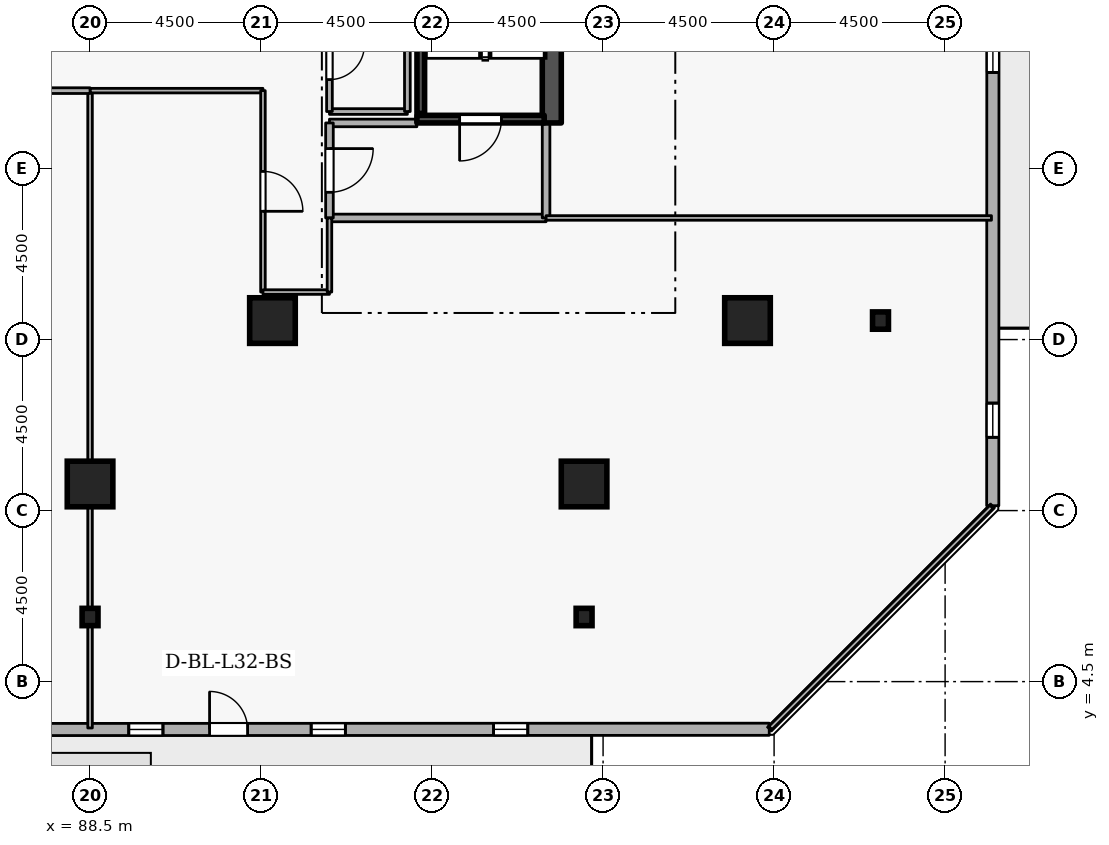
"""IFC4 building model, lengths in metres.
Left out: names, types, materials, properties, quantities, classifications, styles, units other than length and angle.
Written with IfcOpenShell. Run it as: python <this file> out.ifc"""

import sys

from ifc_helpers import new_model, si_unit, direction, frame, frame_2d, origin, origin_2d, place, context, subcontext, project, spatial, rectangle, i_section, extrude, element, fill, save


model = new_model("IFC4")
c1 = context("Model", 3, precision=1e-05, world=origin(), true_north=direction((0.0, 1.0)))
c2 = subcontext(c1, "Body", "Model", "MODEL_VIEW")
j1 = project(units=[si_unit("LENGTHUNIT", "METRE"), si_unit("PLANEANGLEUNIT", "RADIAN")], contexts=[c1])
p1 = place(None, origin())
s1 = spatial("IfcSite", under=j1, at=p1, CompositionType="ELEMENT")
p2 = place(p1, origin())
s2 = spatial("IfcBuilding", under=s1, at=p2, CompositionType="ELEMENT")
p3 = place(p2, frame((0.0, 0.0, 123.3)))
s3 = spatial("IfcBuildingStorey", under=s2, at=p3, CompositionType="ELEMENT", Elevation=123.3)
p4 = place(p3, frame((100.65, 19.2, 0.0), z_axis=(0.0, 0.0, 1.0), x_axis=(0.0, 1.0, 0.0)))
e1 = element("IfcWall", 1, at=p4, inside=s3, PredefinedType="SHEAR", context=c2, shape_type="SweptSolid", body=[
    extrude(rectangle(XDim=15.6, YDim=0.5, at=frame_2d((7.8, 0.0))), origin(), (0.0, 0.0, 1.0), 3.6),
])
for number, where, z_axis, x_axis in (
    (2, (105.8, 14.0, 0.0), (0.0, 0.0, 1.0), (1.0, 0.0, 0.0)),
    (3, (101.5, 9.7, 0.0), (0.0, 0.0, 1.0), (1.0, 0.0, 0.0)),
    (4, (88.5, 9.7, 0.0), (0.0, 0.0, 1.0), (1.0, 0.0, 0.0)),
    (5, (93.3, 14.0, 0.0), (0.0, 0.0, 1.0), (1.0, 0.0, 0.0)),
):
    element("IfcColumn", number, at=place(p3, frame(where, z_axis=z_axis, x_axis=x_axis)), inside=s3, PredefinedType="COLUMN", context=c2, shape_type="SweptSolid", body=[
        extrude(rectangle(XDim=1.2, YDim=1.2, at=origin_2d()), origin(), (0.0, 0.0, 1.0), 3.6),
    ])
for number, where, z_axis, x_axis in (
    (6, (109.3, 14.0, 0.0), (0.0, 0.0, 1.0), (1.0, 0.0, 0.0)),
    (7, (101.5, 6.2, 0.0), (0.0, 0.0, 1.0), (1.0, 0.0, 0.0)),
    (8, (88.5, 6.2, 0.0), (0.0, 0.0, 1.0), (1.0, 0.0, 0.0)),
):
    element("IfcColumn", number, at=place(p3, frame(where, z_axis=z_axis, x_axis=x_axis)), inside=s3, PredefinedType="COLUMN", context=c2, shape_type="SweptSolid", body=[
        extrude(i_section(OverallWidth=0.418, OverallDepth=0.456, WebThickness=0.042, FlangeThickness=0.067, FilletRadius=0.015, at=origin_2d()), origin(), (0.0, 0.0, 1.0), 3.6),
    ])
p5 = place(p3, frame((73.319, 3.235, 0.0), z_axis=(0.0, 0.0, 1.0), x_axis=(0.999999944762, 0.000332378036, 0.0)))
e9 = element("IfcWall", 9, at=p5, inside=s3, PredefinedType="STANDARD", context=c2, shape_type="SweptSolid", body=[
    extrude(rectangle(XDim=33.054, YDim=0.32, at=frame_2d((16.527, 0.0))), origin(), (0.0, 0.0, 1.0), 2.7),
])
p6 = place(p5, frame((18.327, 0.0, 0.0)))
e10 = element("IfcOpeningElement", 10, at=p6, cuts=e9, PredefinedType="OPENING", context=c2, shape_type="SweptSolid", body=[
    extrude(rectangle(XDim=1.0, YDim=2.08, at=frame_2d((0.5, 1.04))), frame((0.0, 0.17, 0.0), z_axis=(0.0, -1.0, 0.0), x_axis=(1.0, 0.0, 0.0)), (0.0, 0.0, 1.0), 0.34),
])
p7 = place(p5, frame((1.8, 0.0, 0.72)))
e11 = element("IfcOpeningElement", 11, at=p7, cuts=e9, PredefinedType="OPENING", context=c2, shape_type="SweptSolid", body=[
    extrude(rectangle(XDim=0.9, YDim=1.75, at=frame_2d((0.45, 0.875))), frame((0.0, 0.17, 0.0), z_axis=(0.0, -1.0, 0.0), x_axis=(1.0, 0.0, 0.0)), (0.0, 0.0, 1.0), 0.34),
])
p8 = place(p5, frame((6.6, 0.0, 0.72)))
e12 = element("IfcOpeningElement", 12, at=p8, cuts=e9, PredefinedType="OPENING", context=c2, shape_type="SweptSolid", body=[
    extrude(rectangle(XDim=0.9, YDim=1.75, at=frame_2d((0.45, 0.875))), frame((0.0, 0.17, 0.0), z_axis=(0.0, -1.0, 0.0), x_axis=(1.0, 0.0, 0.0)), (0.0, 0.0, 1.0), 0.34),
])
p9 = place(p5, frame((11.4, 0.0, 0.72)))
e13 = element("IfcOpeningElement", 13, at=p9, cuts=e9, PredefinedType="OPENING", context=c2, shape_type="SweptSolid", body=[
    extrude(rectangle(XDim=0.9, YDim=1.75, at=frame_2d((0.45, 0.875))), frame((0.0, 0.17, 0.0), z_axis=(0.0, -1.0, 0.0), x_axis=(1.0, 0.0, 0.0)), (0.0, 0.0, 1.0), 0.34),
])
p10 = place(p5, frame((16.2, 0.0, 0.72)))
e14 = element("IfcOpeningElement", 14, at=p10, cuts=e9, PredefinedType="OPENING", context=c2, shape_type="SweptSolid", body=[
    extrude(rectangle(XDim=0.9, YDim=1.75, at=frame_2d((0.45, 0.875))), frame((0.0, 0.17, 0.0), z_axis=(0.0, -1.0, 0.0), x_axis=(1.0, 0.0, 0.0)), (0.0, 0.0, 1.0), 0.34),
])
p11 = place(p5, frame((21.0, 0.0, 0.72)))
e15 = element("IfcOpeningElement", 15, at=p11, cuts=e9, PredefinedType="OPENING", context=c2, shape_type="SweptSolid", body=[
    extrude(rectangle(XDim=0.9, YDim=1.75, at=frame_2d((0.45, 0.875))), frame((0.0, 0.17, 0.0), z_axis=(0.0, -1.0, 0.0), x_axis=(1.0, 0.0, 0.0)), (0.0, 0.0, 1.0), 0.34),
])
p12 = place(p5, frame((25.8, 0.0, 0.72)))
e16 = element("IfcOpeningElement", 16, at=p12, cuts=e9, PredefinedType="OPENING", context=c2, shape_type="SweptSolid", body=[
    extrude(rectangle(XDim=0.9, YDim=1.75, at=frame_2d((0.45, 0.875))), frame((0.0, 0.17, 0.0), z_axis=(0.0, -1.0, 0.0), x_axis=(1.0, 0.0, 0.0)), (0.0, 0.0, 1.0), 0.34),
])
p13 = place(p3, frame((112.254, 9.128, 0.0), z_axis=(0.0, 0.0, 1.0), x_axis=(0.000332378036, 0.999999944762, 0.0)))
e17 = element("IfcWall", 17, at=p13, inside=s3, PredefinedType="STANDARD", context=c2, shape_type="SweptSolid", body=[
    extrude(rectangle(XDim=33.054, YDim=0.32, at=frame_2d((16.527, 0.0))), origin(), (0.0, 0.0, 1.0), 2.7),
])
p14 = place(p13, frame((25.977, 0.0, 0.0)))
e18 = element("IfcOpeningElement", 18, at=p14, cuts=e17, PredefinedType="OPENING", context=c2, shape_type="SweptSolid", body=[
    extrude(rectangle(XDim=1.0, YDim=2.08, at=frame_2d((0.5, 1.04))), frame((0.0, 0.17, 0.0), z_axis=(0.0, -1.0, 0.0), x_axis=(1.0, 0.0, 0.0)), (0.0, 0.0, 1.0), 0.34),
])
p15 = place(p13, frame((1.8, 0.0, 0.72)))
e19 = element("IfcOpeningElement", 19, at=p15, cuts=e17, PredefinedType="OPENING", context=c2, shape_type="SweptSolid", body=[
    extrude(rectangle(XDim=0.9, YDim=1.75, at=frame_2d((0.45, 0.875))), frame((0.0, 0.17, 0.0), z_axis=(0.0, -1.0, 0.0), x_axis=(1.0, 0.0, 0.0)), (0.0, 0.0, 1.0), 0.34),
])
p16 = place(p13, frame((11.4, 0.0, 0.72)))
e20 = element("IfcOpeningElement", 20, at=p16, cuts=e17, PredefinedType="OPENING", context=c2, shape_type="SweptSolid", body=[
    extrude(rectangle(XDim=0.9, YDim=1.75, at=frame_2d((0.45, 0.875))), frame((0.0, 0.17, 0.0), z_axis=(0.0, -1.0, 0.0), x_axis=(1.0, 0.0, 0.0)), (0.0, 0.0, 1.0), 0.34),
])
p17 = place(p13, frame((16.2, 0.0, 0.72)))
e21 = element("IfcOpeningElement", 21, at=p17, cuts=e17, PredefinedType="OPENING", context=c2, shape_type="SweptSolid", body=[
    extrude(rectangle(XDim=0.9, YDim=1.75, at=frame_2d((0.45, 0.875))), frame((0.0, 0.17, 0.0), z_axis=(0.0, -1.0, 0.0), x_axis=(1.0, 0.0, 0.0)), (0.0, 0.0, 1.0), 0.34),
])
p18 = place(p13, frame((21.0, 0.0, 0.72)))
e22 = element("IfcOpeningElement", 22, at=p18, cuts=e17, PredefinedType="OPENING", context=c2, shape_type="SweptSolid", body=[
    extrude(rectangle(XDim=0.9, YDim=1.75, at=frame_2d((0.45, 0.875))), frame((0.0, 0.17, 0.0), z_axis=(0.0, -1.0, 0.0), x_axis=(1.0, 0.0, 0.0)), (0.0, 0.0, 1.0), 0.34),
])
p19 = place(p3, frame((100.45, 19.3, 0.0), z_axis=(0.0, 0.0, 1.0), x_axis=(-1.0, 0.0, 0.0)))
e23 = element("IfcWall", 23, at=p19, inside=s3, PredefinedType="SHEAR", context=c2, shape_type="SweptSolid", body=[
    extrude(rectangle(XDim=3.35, YDim=0.2, at=frame_2d((1.675, 0.0))), origin(), (0.0, 0.0, 1.0), 3.6),
])
p20 = place(p19, frame((1.125, 0.0, 0.0)))
e24 = element("IfcOpeningElement", 24, at=p20, cuts=e23, PredefinedType="OPENING", context=c2, shape_type="SweptSolid", body=[
    extrude(rectangle(XDim=1.1, YDim=2.1, at=frame_2d((0.55, 1.05))), frame((0.0, 0.11, 0.0), z_axis=(0.0, -1.0, 0.0), x_axis=(1.0, 0.0, 0.0)), (0.0, 0.0, 1.0), 0.22),
])
p21 = place(p3, frame((97.203, 26.55, 0.0), z_axis=(0.0, 0.0, 1.0), x_axis=(0.0, -1.0, 0.0)))
e25 = element("IfcWall", 25, at=p21, inside=s3, PredefinedType="SHEAR", context=c2, shape_type="SweptSolid", body=[
    extrude(rectangle(XDim=7.1, YDim=0.2, at=frame_2d((3.55, 0.0))), origin(), (0.0, 0.0, 1.0), 3.6),
])
p22 = place(p3, frame((94.8, 16.7, 0.0), z_axis=(0.0, 0.0, 1.0), x_axis=(1.0, 0.0, 0.0)))
e26 = element("IfcWall", 26, at=p22, inside=s3, PredefinedType="STANDARD", context=c2, shape_type="SweptSolid", body=[
    extrude(rectangle(XDim=5.7, YDim=0.2, at=frame_2d((2.85, 0.0))), origin(), (0.0, 0.0, 1.0), 3.34),
])
p23 = place(p3, frame((100.5, 16.7, 0.0), z_axis=(0.0, 0.0, 1.0), x_axis=(0.0, 1.0, 0.0)))
e27 = element("IfcWall", 27, at=p23, inside=s3, PredefinedType="STANDARD", context=c2, shape_type="SweptSolid", body=[
    extrude(rectangle(XDim=2.5, YDim=0.2, at=frame_2d((1.25, 0.0))), origin(), (0.0, 0.0, 1.0), 3.34),
])
p24 = place(p3, frame((97.1, 19.2, 0.0), z_axis=(0.0, 0.0, 1.0), x_axis=(-1.0, 0.0, 0.0)))
e28 = element("IfcWall", 28, at=p24, inside=s3, PredefinedType="STANDARD", context=c2, shape_type="SweptSolid", body=[
    extrude(rectangle(XDim=2.3, YDim=0.2, at=frame_2d((1.15, 0.0))), origin(), (0.0, 0.0, 1.0), 2.545),
])
p25 = place(p3, frame((94.8, 19.2, 0.0), z_axis=(0.0, 0.0, 1.0), x_axis=(0.0, -1.0, 0.0)))
e29 = element("IfcWall", 29, at=p25, inside=s3, PredefinedType="STANDARD", context=c2, shape_type="SweptSolid", body=[
    extrude(rectangle(XDim=2.5, YDim=0.2, at=frame_2d((1.25, 0.0))), origin(), (0.0, 0.0, 1.0), 3.34),
])
p26 = place(p25, frame((0.675, 0.0, 0.0)))
e30 = element("IfcOpeningElement", 30, at=p26, cuts=e29, PredefinedType="OPENING", context=c2, shape_type="SweptSolid", body=[
    extrude(rectangle(XDim=1.15, YDim=2.1, at=frame_2d((0.575, 1.05))), frame((0.0, 0.11, 0.0), z_axis=(0.0, -1.0, 0.0), x_axis=(1.0, 0.0, 0.0)), (0.0, 0.0, 1.0), 0.22),
])
p27 = place(p3, frame((94.8, 19.5, 0.0), z_axis=(0.0, 0.0, 1.0), x_axis=(1.0, 0.0, 0.0)))
e31 = element("IfcWall", 31, at=p27, inside=s3, PredefinedType="PARTITIONING", context=c2, shape_type="SweptSolid", body=[
    extrude(rectangle(XDim=2.05, YDim=0.15, at=frame_2d((1.025, 0.0))), origin(), (0.0, 0.0, 1.0), 2.545),
])
p28 = place(p3, frame((96.85, 19.5, 0.0), z_axis=(0.0, 0.0, 1.0), x_axis=(0.0, 1.0, 0.0)))
e32 = element("IfcWall", 32, at=p28, inside=s3, PredefinedType="PARTITIONING", context=c2, shape_type="SweptSolid", body=[
    extrude(rectangle(XDim=2.6, YDim=0.15, at=frame_2d((1.3, 0.0))), origin(), (0.0, 0.0, 1.0), 3.34),
])
p29 = place(p3, frame((94.8, 22.1, 0.0), z_axis=(0.0, 0.0, 1.0), x_axis=(0.0, -1.0, 0.0)))
e33 = element("IfcWall", 33, at=p29, inside=s3, PredefinedType="PARTITIONING", context=c2, shape_type="SweptSolid", body=[
    extrude(rectangle(XDim=2.6, YDim=0.15, at=frame_2d((1.3, 0.0))), origin(), (0.0, 0.0, 1.0), 3.34),
])
p30 = place(p29, frame((0.84, 0.0, 0.0)))
e34 = element("IfcOpeningElement", 34, at=p30, cuts=e33, PredefinedType="OPENING", context=c2, shape_type="SweptSolid", body=[
    extrude(rectangle(XDim=0.92, YDim=2.08, at=frame_2d((0.46, 1.04))), frame((0.0, 0.085, 0.0), z_axis=(0.0, -1.0, 0.0), x_axis=(1.0, 0.0, 0.0)), (0.0, 0.0, 1.0), 0.17),
])
p31 = place(p3, frame((88.5, 3.28, 0.0), z_axis=(0.0, 0.0, 1.0), x_axis=(0.0, 1.0, 0.0)))
e35 = element("IfcWall", 35, at=p31, inside=s3, PredefinedType="PARTITIONING", context=c2, shape_type="SweptSolid", body=[
    extrude(rectangle(XDim=16.77, YDim=0.12, at=frame_2d((8.385, 0.0))), origin(), (0.0, 0.0, 1.0), 2.932),
])
p32 = place(p3, frame((88.5, 20.05, 0.0), z_axis=(0.0, 0.0, 1.0), x_axis=(1.0, 0.0, 0.0)))
e36 = element("IfcWall", 36, at=p32, inside=s3, PredefinedType="PARTITIONING", context=c2, shape_type="SweptSolid", body=[
    extrude(rectangle(XDim=4.55, YDim=0.12, at=frame_2d((2.275, 0.0))), origin(), (0.0, 0.0, 1.0), 3.34),
])
p33 = place(p3, frame((93.05, 20.05, 0.0), z_axis=(0.0, 0.0, 1.0), x_axis=(0.0, -1.0, 0.0)))
e37 = element("IfcWall", 37, at=p33, inside=s3, PredefinedType="PARTITIONING", context=c2, shape_type="SweptSolid", body=[
    extrude(rectangle(XDim=5.3, YDim=0.12, at=frame_2d((2.65, 0.0))), origin(), (0.0, 0.0, 1.0), 3.34),
])
p34 = place(p33, frame((2.125, 0.0, 0.0)))
e38 = element("IfcOpeningElement", 38, at=p34, cuts=e37, PredefinedType="OPENING", context=c2, shape_type="SweptSolid", body=[
    extrude(rectangle(XDim=1.05, YDim=2.1, at=frame_2d((0.525, 1.05))), frame((0.0, 0.07, 0.0), z_axis=(0.0, -1.0, 0.0), x_axis=(1.0, 0.0, 0.0)), (0.0, 0.0, 1.0), 0.14),
])
p35 = place(p3, frame((93.05, 14.75, 0.0), z_axis=(0.0, 0.0, 1.0), x_axis=(1.0, 0.0, 0.0)))
e39 = element("IfcWall", 39, at=p35, inside=s3, PredefinedType="PARTITIONING", context=c2, shape_type="SweptSolid", body=[
    extrude(rectangle(XDim=1.75, YDim=0.12, at=frame_2d((0.875, 0.0))), origin(), (0.0, 0.0, 1.0), 3.34),
])
p36 = place(p3, frame((94.8, 14.75, 0.0), z_axis=(0.0, 0.0, 1.0), x_axis=(0.0, 1.0, 0.0)))
e40 = element("IfcWall", 40, at=p36, inside=s3, PredefinedType="PARTITIONING", context=c2, shape_type="SweptSolid", body=[
    extrude(rectangle(XDim=1.95, YDim=0.12, at=frame_2d((0.975, 0.0))), origin(), (0.0, 0.0, 1.0), 3.34),
])
p37 = place(p3, frame((100.5, 16.7, 0.0), z_axis=(0.0, 0.0, 1.0), x_axis=(1.0, 0.0, 0.0)))
e41 = element("IfcWall", 41, at=p37, inside=s3, PredefinedType="PARTITIONING", context=c2, shape_type="SweptSolid", body=[
    extrude(rectangle(XDim=11.72, YDim=0.12, at=frame_2d((5.86, 0.0))), origin(), (0.0, 0.0, 1.0), 3.34),
])
p38 = place(p3, frame((112.22, 9.098, 0.0), z_axis=(0.0, 0.0, 1.0), x_axis=(-0.707106781187, -0.707106781187, 0.0)))
e42 = element("IfcWall", 42, at=p38, inside=s3, PredefinedType="PARTITIONING", context=c2, shape_type="SweptSolid", body=[
    extrude(rectangle(XDim=8.227, YDim=0.12, at=frame_2d((4.114, 0.0))), origin(), (0.0, 0.0, 1.0), 3.34),
])
p39 = place(p3, frame((83.95, 20.05, 0.0), z_axis=(0.0, 0.0, 1.0), x_axis=(1.0, 0.0, 0.0)))
e43 = element("IfcWall", 43, at=p39, inside=s3, PredefinedType="PARTITIONING", context=c2, shape_type="SweptSolid", body=[
    extrude(rectangle(XDim=4.55, YDim=0.15, at=frame_2d((2.275, 0.0))), origin(), (0.0, 0.0, 1.0), 3.34),
])
p40 = place(p6, origin())
e44 = element("IfcDoor", 44, at=p40, inside=s3, OperationType="SINGLE_SWING_LEFT", PredefinedType="DOOR", context=c2, shape_type="SweptSolid", body=[
    extrude(rectangle(XDim=1.0, YDim=2.08, at=frame_2d((0.5, 1.04))), frame((0.0, 0.025, 0.0), z_axis=(0.0, -1.0, 0.0), x_axis=(1.0, 0.0, 0.0)), (0.0, 0.0, 1.0), 0.05),
])
fill(e10, e44)
p41 = place(p10, origin())
e45 = element("IfcWindow", 45, at=p41, inside=s3, PartitioningType="SINGLE_PANEL", PredefinedType="WINDOW", context=c2, shape_type="SweptSolid", body=[
    extrude(rectangle(XDim=0.9, YDim=1.75, at=frame_2d((0.45, 0.875))), frame((0.0, 0.03, 0.0), z_axis=(0.0, -1.0, 0.0), x_axis=(1.0, 0.0, 0.0)), (0.0, 0.0, 1.0), 0.06),
])
fill(e14, e45)
p42 = place(p11, origin())
e46 = element("IfcWindow", 46, at=p42, inside=s3, PartitioningType="SINGLE_PANEL", PredefinedType="WINDOW", context=c2, shape_type="SweptSolid", body=[
    extrude(rectangle(XDim=0.9, YDim=1.75, at=frame_2d((0.45, 0.875))), frame((0.0, 0.03, 0.0), z_axis=(0.0, -1.0, 0.0), x_axis=(1.0, 0.0, 0.0)), (0.0, 0.0, 1.0), 0.06),
])
fill(e15, e46)
p43 = place(p12, origin())
e47 = element("IfcWindow", 47, at=p43, inside=s3, PartitioningType="SINGLE_PANEL", PredefinedType="WINDOW", context=c2, shape_type="SweptSolid", body=[
    extrude(rectangle(XDim=0.9, YDim=1.75, at=frame_2d((0.45, 0.875))), frame((0.0, 0.03, 0.0), z_axis=(0.0, -1.0, 0.0), x_axis=(1.0, 0.0, 0.0)), (0.0, 0.0, 1.0), 0.06),
])
fill(e16, e47)
p44 = place(p15, origin())
e48 = element("IfcWindow", 48, at=p44, inside=s3, PartitioningType="SINGLE_PANEL", PredefinedType="WINDOW", context=c2, shape_type="SweptSolid", body=[
    extrude(rectangle(XDim=0.9, YDim=1.75, at=frame_2d((0.45, 0.875))), frame((0.0, 0.03, 0.0), z_axis=(0.0, -1.0, 0.0), x_axis=(1.0, 0.0, 0.0)), (0.0, 0.0, 1.0), 0.06),
])
fill(e19, e48)
p45 = place(p16, origin())
e49 = element("IfcWindow", 49, at=p45, inside=s3, PartitioningType="SINGLE_PANEL", PredefinedType="WINDOW", context=c2, shape_type="SweptSolid", body=[
    extrude(rectangle(XDim=0.9, YDim=1.75, at=frame_2d((0.45, 0.875))), frame((0.0, 0.03, 0.0), z_axis=(0.0, -1.0, 0.0), x_axis=(1.0, 0.0, 0.0)), (0.0, 0.0, 1.0), 0.06),
])
fill(e20, e49)
p46 = place(p20, origin())
e50 = element("IfcDoor", 50, at=p46, inside=s3, OperationType="SINGLE_SWING_RIGHT", PredefinedType="DOOR", context=c2, shape_type="SweptSolid", body=[
    extrude(rectangle(XDim=1.1, YDim=2.1, at=frame_2d((0.55, 1.05))), frame((0.0, 0.025, 0.0), z_axis=(0.0, -1.0, 0.0), x_axis=(1.0, 0.0, 0.0)), (0.0, 0.0, 1.0), 0.05),
])
fill(e24, e50)
p47 = place(p26, origin())
e51 = element("IfcDoor", 51, at=p47, inside=s3, OperationType="SINGLE_SWING_LEFT", PredefinedType="DOOR", context=c2, shape_type="SweptSolid", body=[
    extrude(rectangle(XDim=1.15, YDim=2.1, at=frame_2d((0.575, 1.05))), frame((0.0, 0.025, 0.0), z_axis=(0.0, -1.0, 0.0), x_axis=(1.0, 0.0, 0.0)), (0.0, 0.0, 1.0), 0.05),
])
fill(e30, e51)
p48 = place(p30, origin())
e52 = element("IfcDoor", 52, at=p48, inside=s3, OperationType="SINGLE_SWING_LEFT", PredefinedType="DOOR", context=c2, shape_type="SweptSolid", body=[
    extrude(rectangle(XDim=0.92, YDim=2.08, at=frame_2d((0.46, 1.04))), frame((0.0, 0.025, 0.0), z_axis=(0.0, -1.0, 0.0), x_axis=(1.0, 0.0, 0.0)), (0.0, 0.0, 1.0), 0.05),
])
fill(e34, e52)
p49 = place(p34, origin())
e53 = element("IfcDoor", 53, at=p49, inside=s3, OperationType="SINGLE_SWING_RIGHT", PredefinedType="DOOR", context=c2, shape_type="SweptSolid", body=[
    extrude(rectangle(XDim=1.05, YDim=2.1, at=frame_2d((0.525, 1.05))), frame((0.0, 0.025, 0.0), z_axis=(0.0, -1.0, 0.0), x_axis=(1.0, 0.0, 0.0)), (0.0, 0.0, 1.0), 0.05),
])
fill(e38, e53)
save(model, sys.argv[1])
